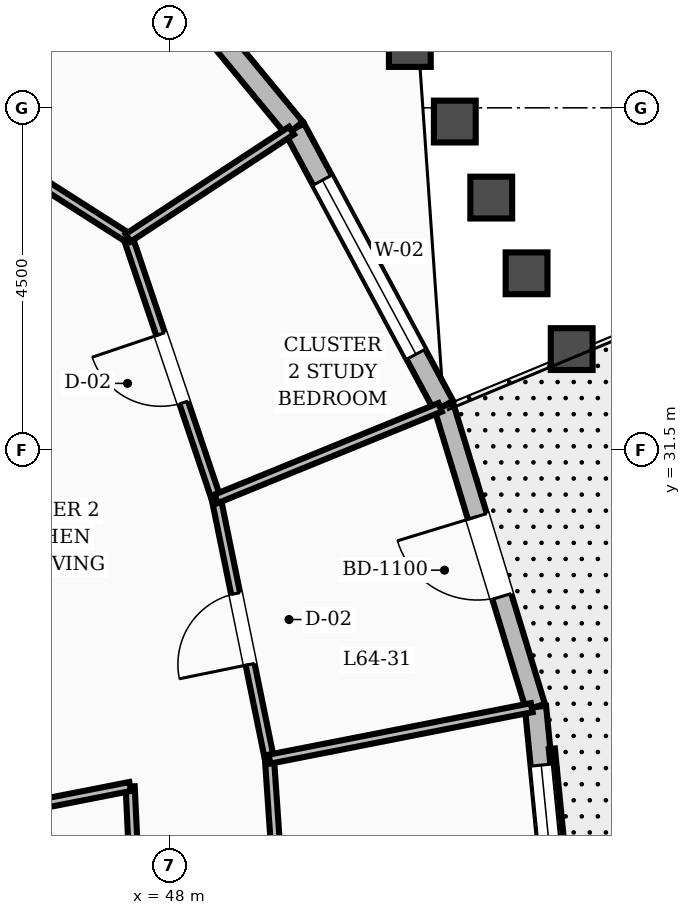
"""IFC4 building model, lengths in metres.
Left out: names, types, materials, properties, quantities, classifications, styles, units other than length and angle.
Written with IfcOpenShell. Run it as: python <this file> out.ifc"""

import sys

from ifc_helpers import new_model, si_unit, direction, frame, frame_2d, origin, place, context, subcontext, project, spatial, rectangle, extrude, element, fill, save


model = new_model("IFC4")
c1 = context("Model", 3, precision=1e-05, world=origin(), true_north=direction((0.0, 1.0)))
c2 = subcontext(c1, "Body", "Model", "MODEL_VIEW")
j1 = project(units=[si_unit("LENGTHUNIT", "METRE"), si_unit("PLANEANGLEUNIT", "RADIAN")], contexts=[c1])
p1 = place(None, origin())
s1 = spatial("IfcSite", under=j1, at=p1, CompositionType="ELEMENT")
p2 = place(p1, origin())
s2 = spatial("IfcBuilding", under=s1, at=p2, CompositionType="ELEMENT")
p3 = place(p2, frame((0.0, 0.0, 247.2)))
s3 = spatial("IfcBuildingStorey", under=s2, at=p3, CompositionType="ELEMENT", Elevation=247.2)
p4 = place(p3, frame((53.236, 23.84, 0.0), z_axis=(0.0, 0.0, 1.0), x_axis=(-0.098514226855, 0.995135642567, 0.0)))
e1 = element("IfcWall", 1, at=p4, inside=s3, PredefinedType="STANDARD", context=c2, shape_type="SweptSolid", body=[
    extrude(rectangle(XDim=4.3, YDim=0.28, at=frame_2d((2.15, 0.0))), origin(), (0.0, 0.0, 1.0), 2.88),
])
p5 = place(p4, frame((0.93, 0.0, 0.8)))
e2 = element("IfcOpeningElement", 2, at=p5, cuts=e1, PredefinedType="OPENING", context=c2, shape_type="SweptSolid", body=[
    extrude(rectangle(XDim=2.6, YDim=1.65, at=frame_2d((1.3, 0.825))), frame((0.0, 0.15, 0.0), z_axis=(0.0, -1.0, 0.0), x_axis=(1.0, 0.0, 0.0)), (0.0, 0.0, 1.0), 0.3),
])
p6 = place(p3, frame((52.812, 28.118, 0.0), z_axis=(0.0, 0.0, 1.0), x_axis=(-0.291673136786, 0.95651805068, 0.0)))
e3 = element("IfcWall", 3, at=p6, inside=s3, PredefinedType="STANDARD", context=c2, shape_type="SweptSolid", body=[
    extrude(rectangle(XDim=4.14, YDim=0.26, at=frame_2d((2.07, 0.0))), origin(), (0.0, 0.0, 1.0), 2.88),
])
p7 = place(p6, frame((1.52, 0.0, 0.0)))
e4 = element("IfcOpeningElement", 4, at=p7, cuts=e3, PredefinedType="OPENING", context=c2, shape_type="SweptSolid", body=[
    extrude(rectangle(XDim=1.1, YDim=2.15, at=frame_2d((0.55, 1.075))), frame((0.0, 0.14, 0.0), z_axis=(0.0, -1.0, 0.0), x_axis=(1.0, 0.0, 0.0)), (0.0, 0.0, 1.0), 0.28),
])
p8 = place(p3, frame((51.604, 32.078, 0.0), z_axis=(0.0, 0.0, 1.0), x_axis=(-0.473326520675, 0.880887055658, 0.0)))
e5 = element("IfcWall", 5, at=p8, inside=s3, PredefinedType="STANDARD", context=c2, shape_type="SweptSolid", body=[
    extrude(rectangle(XDim=4.143, YDim=0.28, at=frame_2d((2.071, 0.0))), origin(), (0.0, 0.0, 1.0), 2.88),
])
p9 = place(p8, frame((0.771, 0.0, 0.8)))
e6 = element("IfcOpeningElement", 6, at=p9, cuts=e5, PredefinedType="OPENING", context=c2, shape_type="SweptSolid", body=[
    extrude(rectangle(XDim=2.6, YDim=1.65, at=frame_2d((1.3, 0.825))), frame((0.0, 0.15, 0.0), z_axis=(0.0, -1.0, 0.0), x_axis=(1.0, 0.0, 0.0)), (0.0, 0.0, 1.0), 0.3),
])
p10 = place(p3, frame((49.644, 35.728, 0.0), z_axis=(0.0, 0.0, 1.0), x_axis=(-0.63634880002, 0.771401454959, 0.0)))
e7 = element("IfcWall", 7, at=p10, inside=s3, PredefinedType="STANDARD", context=c2, shape_type="SweptSolid", body=[
    extrude(rectangle(XDim=4.147, YDim=0.28, at=frame_2d((2.073, 0.0))), origin(), (0.0, 0.0, 1.0), 2.88),
])
p11 = place(p3, frame((47.626, 24.0, 0.0), z_axis=(0.0, 0.0, 1.0), x_axis=(-0.047719818528, 0.998860760527, 0.0)))
e8 = element("IfcWall", 8, at=p11, inside=s3, PredefinedType="PARTITIONING", context=c2, shape_type="SweptSolid", body=[
    extrude(rectangle(XDim=3.075, YDim=0.12, at=frame_2d((1.537, 0.0))), origin(), (0.0, 0.0, 1.0), 2.87),
])
p12 = place(p3, frame((44.48, 26.482, 0.0), z_axis=(0.0, 0.0, 1.0), x_axis=(0.981268776343, 0.192643682935, 0.0)))
e9 = element("IfcWall", 9, at=p12, inside=s3, PredefinedType="PARTITIONING", context=c2, shape_type="SweptSolid", body=[
    extrude(rectangle(XDim=3.057, YDim=0.12, at=frame_2d((1.528, 0.0))), origin(), (0.0, 0.0, 1.0), 2.87),
])
p13 = place(p12, frame((0.44, 0.0, 0.0)))
e10 = element("IfcOpeningElement", 10, at=p13, cuts=e9, PredefinedType="OPENING", context=c2, shape_type="SweptSolid", body=[
    extrude(rectangle(XDim=0.86, YDim=2.1, at=frame_2d((0.43, 1.05))), frame((0.0, 0.07, 0.0), z_axis=(0.0, -1.0, 0.0), x_axis=(1.0, 0.0, 0.0)), (0.0, 0.0, 1.0), 0.14),
])
p14 = place(p3, frame((49.549, 24.0, 0.0), z_axis=(0.0, 0.0, 1.0), x_axis=(-0.068785038262, 0.99763150437, 0.0)))
e11 = element("IfcWall", 11, at=p14, inside=s3, PredefinedType="PARTITIONING", context=c2, shape_type="SweptSolid", body=[
    extrude(rectangle(XDim=3.439, YDim=0.12, at=frame_2d((1.72, 0.0))), origin(), (0.0, 0.0, 1.0), 2.87),
])
p15 = place(p14, frame((1.245, 0.0, 0.0)))
e12 = element("IfcOpeningElement", 12, at=p15, cuts=e11, PredefinedType="OPENING", context=c2, shape_type="SweptSolid", body=[
    extrude(rectangle(XDim=0.95, YDim=2.1, at=frame_2d((0.475, 1.05))), frame((0.0, 0.07, 0.0), z_axis=(0.0, -1.0, 0.0), x_axis=(1.0, 0.0, 0.0)), (0.0, 0.0, 1.0), 0.14),
])
p16 = place(p3, frame((49.312, 27.431, 0.0), z_axis=(0.0, 0.0, 1.0), x_axis=(-0.20026371196, 0.979742030165, 0.0)))
e13 = element("IfcWall", 13, at=p16, inside=s3, PredefinedType="PARTITIONING", context=c2, shape_type="SweptSolid", body=[
    extrude(rectangle(XDim=3.496, YDim=0.12, at=frame_2d((1.748, 0.0))), origin(), (0.0, 0.0, 1.0), 2.87),
])
p17 = place(p16, frame((1.273, 0.0, 0.0)))
e14 = element("IfcOpeningElement", 14, at=p17, cuts=e13, PredefinedType="OPENING", context=c2, shape_type="SweptSolid", body=[
    extrude(rectangle(XDim=0.95, YDim=2.1, at=frame_2d((0.475, 1.05))), frame((0.0, 0.07, 0.0), z_axis=(0.0, -1.0, 0.0), x_axis=(1.0, 0.0, 0.0)), (0.0, 0.0, 1.0), 0.14),
])
p18 = place(p3, frame((49.312, 27.431, 0.0), z_axis=(0.0, 0.0, 1.0), x_axis=(0.981263590574, 0.192670095793, 0.0)))
e15 = element("IfcWall", 15, at=p18, inside=s3, PredefinedType="PARTITIONING", context=c2, shape_type="SweptSolid", body=[
    extrude(rectangle(XDim=3.516, YDim=0.12, at=frame_2d((1.758, 0.0))), origin(), (0.0, 0.0, 1.0), 2.87),
])
p19 = place(p3, frame((48.612, 30.857, 0.0), z_axis=(0.0, 0.0, 1.0), x_axis=(-0.320106009533, 0.947381730171, 0.0)))
e16 = element("IfcWall", 16, at=p19, inside=s3, PredefinedType="PARTITIONING", context=c2, shape_type="SweptSolid", body=[
    extrude(rectangle(XDim=3.624, YDim=0.12, at=frame_2d((1.812, 0.0))), origin(), (0.0, 0.0, 1.0), 2.87),
])
p20 = place(p19, frame((1.337, 0.0, 0.0)))
e17 = element("IfcOpeningElement", 17, at=p20, cuts=e16, PredefinedType="OPENING", context=c2, shape_type="SweptSolid", body=[
    extrude(rectangle(XDim=0.95, YDim=2.1, at=frame_2d((0.475, 1.05))), frame((0.0, 0.07, 0.0), z_axis=(0.0, -1.0, 0.0), x_axis=(1.0, 0.0, 0.0)), (0.0, 0.0, 1.0), 0.14),
])
p21 = place(p3, frame((48.612, 30.857, 0.0), z_axis=(0.0, 0.0, 1.0), x_axis=(0.925818055763, 0.377969479752, 0.0)))
e18 = element("IfcWall", 18, at=p21, inside=s3, PredefinedType="PARTITIONING", context=c2, shape_type="SweptSolid", body=[
    extrude(rectangle(XDim=3.182, YDim=0.12, at=frame_2d((1.591, 0.0))), origin(), (0.0, 0.0, 1.0), 2.87),
])
p22 = place(p3, frame((47.452, 34.29, 0.0), z_axis=(0.0, 0.0, 1.0), x_axis=(-0.84332026634, 0.53741132141, 0.0)))
e19 = element("IfcWall", 19, at=p22, inside=s3, PredefinedType="PARTITIONING", context=c2, shape_type="SweptSolid", body=[
    extrude(rectangle(XDim=7.104, YDim=0.12, at=frame_2d((3.552, 0.0))), origin(), (0.0, 0.0, 1.0), 2.87),
])
p23 = place(p22, frame((3.077, 0.0, 0.0)))
e20 = element("IfcOpeningElement", 20, at=p23, cuts=e19, PredefinedType="OPENING", context=c2, shape_type="SweptSolid", body=[
    extrude(rectangle(XDim=0.95, YDim=2.1, at=frame_2d((0.475, 1.05))), frame((0.0, 0.07, 0.0), z_axis=(0.0, -1.0, 0.0), x_axis=(1.0, 0.0, 0.0)), (0.0, 0.0, 1.0), 0.14),
])
p24 = place(p3, frame((47.452, 34.29, 0.0), z_axis=(0.0, 0.0, 1.0), x_axis=(0.835988015849, 0.548747699181, 0.0)))
e21 = element("IfcWall", 21, at=p24, inside=s3, PredefinedType="PARTITIONING", context=c2, shape_type="SweptSolid", body=[
    extrude(rectangle(XDim=2.571, YDim=0.12, at=frame_2d((1.286, 0.0))), origin(), (0.0, 0.0, 1.0), 2.87),
])
p25 = place(p5, origin())
e22 = element("IfcWindow", 22, at=p25, inside=s3, PartitioningType="SINGLE_PANEL", PredefinedType="WINDOW", context=c2, shape_type="SweptSolid", body=[
    extrude(rectangle(XDim=2.6, YDim=1.65, at=frame_2d((1.3, 0.825))), frame((0.0, 0.03, 0.0), z_axis=(0.0, -1.0, 0.0), x_axis=(1.0, 0.0, 0.0)), (0.0, 0.0, 1.0), 0.06),
])
fill(e2, e22)
p26 = place(p7, origin())
e23 = element("IfcDoor", 23, at=p26, inside=s3, OperationType="SINGLE_SWING_RIGHT", PredefinedType="DOOR", context=c2, shape_type="SweptSolid", body=[
    extrude(rectangle(XDim=1.1, YDim=2.15, at=frame_2d((0.55, 1.075))), frame((0.0, 0.025, 0.0), z_axis=(0.0, -1.0, 0.0), x_axis=(1.0, 0.0, 0.0)), (0.0, 0.0, 1.0), 0.05),
])
fill(e4, e23)
p27 = place(p9, origin())
e24 = element("IfcWindow", 24, at=p27, inside=s3, PartitioningType="SINGLE_PANEL", PredefinedType="WINDOW", context=c2, shape_type="SweptSolid", body=[
    extrude(rectangle(XDim=2.6, YDim=1.65, at=frame_2d((1.3, 0.825))), frame((0.0, 0.03, 0.0), z_axis=(0.0, -1.0, 0.0), x_axis=(1.0, 0.0, 0.0)), (0.0, 0.0, 1.0), 0.06),
])
fill(e6, e24)
p28 = place(p17, origin())
e25 = element("IfcDoor", 25, at=p28, inside=s3, OperationType="SINGLE_SWING_LEFT", PredefinedType="DOOR", context=c2, shape_type="SweptSolid", body=[
    extrude(rectangle(XDim=0.95, YDim=2.1, at=frame_2d((0.475, 1.05))), frame((0.0, 0.025, 0.0), z_axis=(0.0, -1.0, 0.0), x_axis=(1.0, 0.0, 0.0)), (0.0, 0.0, 1.0), 0.05),
])
fill(e14, e25)
p29 = place(p20, origin())
e26 = element("IfcDoor", 26, at=p29, inside=s3, OperationType="SINGLE_SWING_RIGHT", PredefinedType="DOOR", context=c2, shape_type="SweptSolid", body=[
    extrude(rectangle(XDim=0.95, YDim=2.1, at=frame_2d((0.475, 1.05))), frame((0.0, 0.025, 0.0), z_axis=(0.0, -1.0, 0.0), x_axis=(1.0, 0.0, 0.0)), (0.0, 0.0, 1.0), 0.05),
])
fill(e17, e26)
save(model, sys.argv[1])
